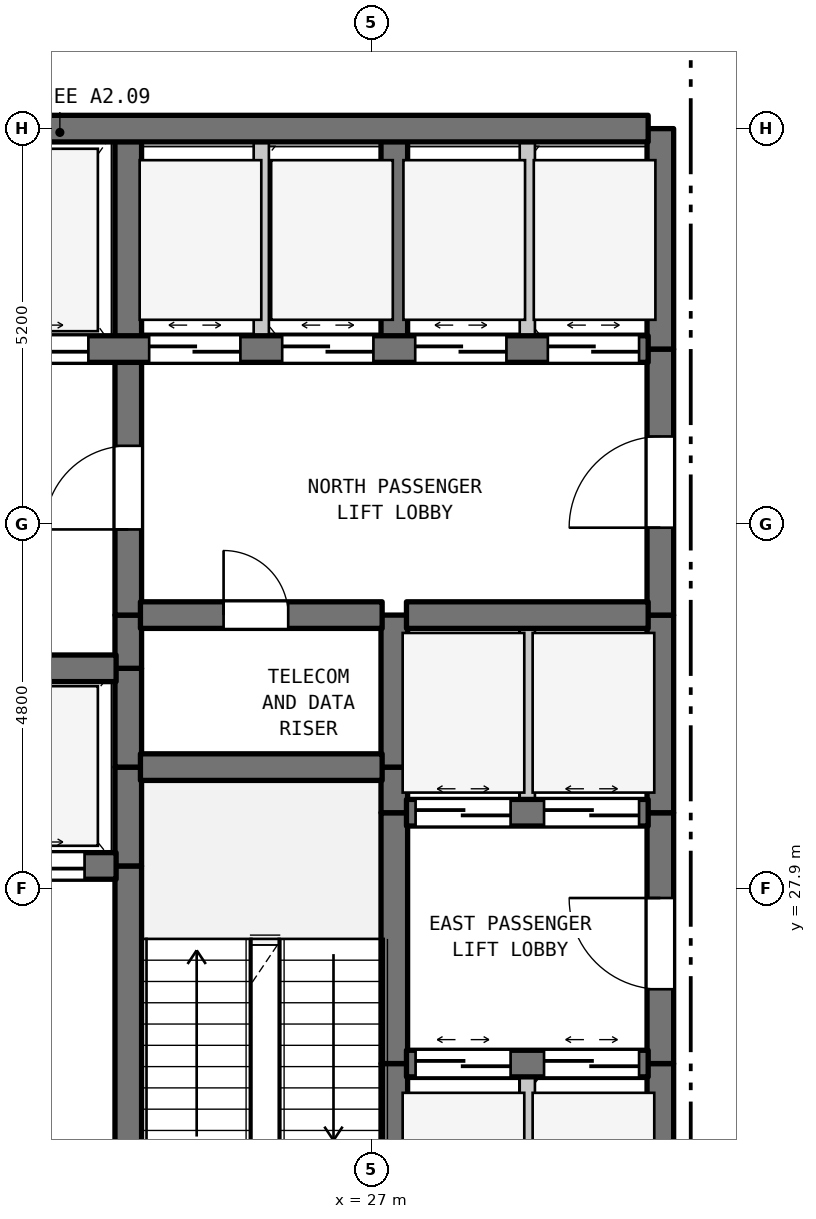
"""IFC4 building model, lengths in metres.
Left out: names, types, materials, properties, quantities, classifications, styles, units other than length and angle.
Written with IfcOpenShell. Run it as: python <this file> out.ifc"""

import sys

from ifc_helpers import new_model, si_unit, direction, frame, frame_2d, origin, place, context, subcontext, project, spatial, rectangle, extrude, element, fill, save


model = new_model("IFC4")
c1 = context("Model", 3, precision=1e-05, world=origin(), true_north=direction((0.0, 1.0)))
c2 = subcontext(c1, "Body", "Model", "MODEL_VIEW")
j1 = project(units=[si_unit("LENGTHUNIT", "METRE"), si_unit("PLANEANGLEUNIT", "RADIAN")], contexts=[c1])
p1 = place(None, origin())
s1 = spatial("IfcSite", under=j1, at=p1, CompositionType="ELEMENT")
p2 = place(p1, origin())
s2 = spatial("IfcBuilding", under=s1, at=p2, CompositionType="ELEMENT")
p3 = place(p2, frame((0.0, 0.0, 98.3)))
s3 = spatial("IfcBuildingStorey", under=s2, at=p3, CompositionType="ELEMENT", Elevation=98.3)
p4 = place(p3, frame((23.8, 22.7, 0.0), z_axis=(0.0, 0.0, 1.0), x_axis=(0.0, 1.0, 0.0)))
e1 = element("IfcWall", 1, at=p4, inside=s3, PredefinedType="SHEAR", context=c2, shape_type="SweptSolid", body=[
    extrude(rectangle(XDim=5.5, YDim=0.35, at=frame_2d((2.75, 0.0))), origin(), (0.0, 0.0, 1.0), 3.385),
])
p5 = place(p4, frame((0.235, 0.0, 0.0)))
e2 = element("IfcOpeningElement", 2, at=p5, cuts=e1, PredefinedType="OPENING", context=c2, shape_type="SweptSolid", body=[
    extrude(rectangle(XDim=1.1, YDim=2.15, at=frame_2d((0.55, 1.075))), frame((0.0, 0.185, 0.0), z_axis=(0.0, -1.0, 0.0), x_axis=(1.0, 0.0, 0.0)), (0.0, 0.0, 1.0), 0.37),
])
for number, where, z_axis, x_axis in (
    (3, (23.8, 28.2, 0.0), (0.0, 0.0, 1.0), (0.0, 1.0, 0.0)),
    (4, (23.8, 29.5, 0.0), (0.0, 0.0, 1.0), (0.0, 1.0, 0.0)),
):
    element("IfcWall", number, at=place(p3, frame(where, z_axis=z_axis, x_axis=x_axis)), inside=s3, PredefinedType="SHEAR", context=c2, shape_type="SweptSolid", body=[
        extrude(rectangle(XDim=1.3, YDim=0.35, at=frame_2d((0.65, 0.0))), origin(), (0.0, 0.0, 1.0), 3.385),
    ])
p6 = place(p3, frame((23.8, 30.8, 0.0), z_axis=(0.0, 0.0, 1.0), x_axis=(0.0, 1.0, 0.0)))
e5 = element("IfcWall", 5, at=p6, inside=s3, PredefinedType="SHEAR", context=c2, shape_type="SweptSolid", body=[
    extrude(rectangle(XDim=0.7, YDim=0.35, at=frame_2d((0.35, 0.0))), origin(), (0.0, 0.0, 1.0), 3.385),
])
p7 = place(p3, frame((23.8, 31.5, 0.0), z_axis=(0.0, 0.0, 1.0), x_axis=(0.0, 1.0, 0.0)))
e6 = element("IfcWall", 6, at=p7, inside=s3, PredefinedType="SHEAR", context=c2, shape_type="SweptSolid", body=[
    extrude(rectangle(XDim=3.5, YDim=0.35, at=frame_2d((1.75, 0.0))), origin(), (0.0, 0.0, 1.0), 3.385),
])
p8 = place(p7, frame((1.127, 0.0, 0.0)))
e7 = element("IfcOpeningElement", 7, at=p8, cuts=e6, PredefinedType="OPENING", context=c2, shape_type="SweptSolid", body=[
    extrude(rectangle(XDim=1.1, YDim=2.15, at=frame_2d((0.55, 1.075))), frame((0.0, 0.185, 0.0), z_axis=(0.0, -1.0, 0.0), x_axis=(1.0, 0.0, 0.0)), (0.0, 0.0, 1.0), 0.37),
])
p9 = place(p3, frame((23.8, 35.0, 0.0), z_axis=(0.0, 0.0, 1.0), x_axis=(0.0, 1.0, 0.0)))
e8 = element("IfcWall", 8, at=p9, inside=s3, PredefinedType="SHEAR", context=c2, shape_type="SweptSolid", body=[
    extrude(rectangle(XDim=2.9, YDim=0.35, at=frame_2d((1.45, 0.0))), origin(), (0.0, 0.0, 1.0), 3.385),
])
p10 = place(p3, frame((25.55, 35.0, 0.0), z_axis=(0.0, 0.0, 1.0), x_axis=(0.0, 1.0, 0.0)))
e9 = element("IfcWall", 9, at=p10, inside=s3, PredefinedType="STANDARD", context=c2, shape_type="SweptSolid", body=[
    extrude(rectangle(XDim=2.9, YDim=0.2, at=frame_2d((1.45, 0.0))), origin(), (0.0, 0.0, 1.0), 3.385),
])
p11 = place(p3, frame((27.3, 22.7, 0.0), z_axis=(0.0, 0.0, 1.0), x_axis=(0.0, 1.0, 0.0)))
e10 = element("IfcWall", 10, at=p11, inside=s3, PredefinedType="SHEAR", context=c2, shape_type="SweptSolid", body=[
    extrude(rectangle(XDim=2.9, YDim=0.35, at=frame_2d((1.45, 0.0))), origin(), (0.0, 0.0, 1.0), 3.385),
])
p12 = place(p3, frame((27.3, 25.6, 0.0), z_axis=(0.0, 0.0, 1.0), x_axis=(0.0, 1.0, 0.0)))
e11 = element("IfcWall", 11, at=p12, inside=s3, PredefinedType="SHEAR", context=c2, shape_type="SweptSolid", body=[
    extrude(rectangle(XDim=3.3, YDim=0.35, at=frame_2d((1.65, 0.0))), origin(), (0.0, 0.0, 1.0), 3.385),
])
p13 = place(p3, frame((27.3, 28.9, 0.0), z_axis=(0.0, 0.0, 1.0), x_axis=(0.0, 1.0, 0.0)))
e12 = element("IfcWall", 12, at=p13, inside=s3, PredefinedType="SHEAR", context=c2, shape_type="SweptSolid", body=[
    extrude(rectangle(XDim=0.6, YDim=0.35, at=frame_2d((0.3, 0.0))), origin(), (0.0, 0.0, 1.0), 3.385),
])
p14 = place(p3, frame((27.3, 29.5, 0.0), z_axis=(0.0, 0.0, 1.0), x_axis=(0.0, 1.0, 0.0)))
e13 = element("IfcWall", 13, at=p14, inside=s3, PredefinedType="SHEAR", context=c2, shape_type="SweptSolid", body=[
    extrude(rectangle(XDim=2.0, YDim=0.35, at=frame_2d((1.0, 0.0))), origin(), (0.0, 0.0, 1.0), 3.385),
])
p15 = place(p3, frame((27.3, 35.0, 0.0), z_axis=(0.0, 0.0, 1.0), x_axis=(0.0, 1.0, 0.0)))
e14 = element("IfcWall", 14, at=p15, inside=s3, PredefinedType="SHEAR", context=c2, shape_type="SweptSolid", body=[
    extrude(rectangle(XDim=2.9, YDim=0.35, at=frame_2d((1.45, 0.0))), origin(), (0.0, 0.0, 1.0), 3.385),
])
p16 = place(p3, frame((29.05, 22.7, 0.0), z_axis=(0.0, 0.0, 1.0), x_axis=(0.0, 1.0, 0.0)))
e15 = element("IfcWall", 15, at=p16, inside=s3, PredefinedType="STANDARD", context=c2, shape_type="SweptSolid", body=[
    extrude(rectangle(XDim=2.9, YDim=0.2, at=frame_2d((1.45, 0.0))), origin(), (0.0, 0.0, 1.0), 3.385),
])
p17 = place(p3, frame((29.05, 28.9, 0.0), z_axis=(0.0, 0.0, 1.0), x_axis=(0.0, 1.0, 0.0)))
e16 = element("IfcWall", 16, at=p17, inside=s3, PredefinedType="STANDARD", context=c2, shape_type="SweptSolid", body=[
    extrude(rectangle(XDim=2.6, YDim=0.2, at=frame_2d((1.3, 0.0))), origin(), (0.0, 0.0, 1.0), 3.385),
])
p18 = place(p3, frame((29.05, 35.0, 0.0), z_axis=(0.0, 0.0, 1.0), x_axis=(0.0, 1.0, 0.0)))
e17 = element("IfcWall", 17, at=p18, inside=s3, PredefinedType="STANDARD", context=c2, shape_type="SweptSolid", body=[
    extrude(rectangle(XDim=2.9, YDim=0.2, at=frame_2d((1.45, 0.0))), origin(), (0.0, 0.0, 1.0), 3.385),
])
p19 = place(p3, frame((30.8, 22.7, 0.0), z_axis=(0.0, 0.0, 1.0), x_axis=(0.0, 1.0, 0.0)))
e18 = element("IfcWall", 18, at=p19, inside=s3, PredefinedType="SHEAR", context=c2, shape_type="SweptSolid", body=[
    extrude(rectangle(XDim=2.9, YDim=0.35, at=frame_2d((1.45, 0.0))), origin(), (0.0, 0.0, 1.0), 3.385),
])
p20 = place(p3, frame((30.8, 25.6, 0.0), z_axis=(0.0, 0.0, 1.0), x_axis=(0.0, 1.0, 0.0)))
e19 = element("IfcWall", 19, at=p20, inside=s3, PredefinedType="SHEAR", context=c2, shape_type="SweptSolid", body=[
    extrude(rectangle(XDim=3.3, YDim=0.35, at=frame_2d((1.65, 0.0))), origin(), (0.0, 0.0, 1.0), 3.385),
])
p21 = place(p20, frame((0.978, 0.0, 0.0)))
e20 = element("IfcOpeningElement", 20, at=p21, cuts=e19, PredefinedType="OPENING", context=c2, shape_type="SweptSolid", body=[
    extrude(rectangle(XDim=1.2, YDim=2.2, at=frame_2d((0.6, 1.1))), frame((0.0, 0.185, 0.0), z_axis=(0.0, -1.0, 0.0), x_axis=(1.0, 0.0, 0.0)), (0.0, 0.0, 1.0), 0.37),
])
p22 = place(p3, frame((30.8, 28.9, 0.0), z_axis=(0.0, 0.0, 1.0), x_axis=(0.0, 1.0, 0.0)))
e21 = element("IfcWall", 21, at=p22, inside=s3, PredefinedType="SHEAR", context=c2, shape_type="SweptSolid", body=[
    extrude(rectangle(XDim=2.6, YDim=0.35, at=frame_2d((1.3, 0.0))), origin(), (0.0, 0.0, 1.0), 3.385),
])
p23 = place(p3, frame((30.8, 31.5, 0.0), z_axis=(0.0, 0.0, 1.0), x_axis=(0.0, 1.0, 0.0)))
e22 = element("IfcWall", 22, at=p23, inside=s3, PredefinedType="SHEAR", context=c2, shape_type="SweptSolid", body=[
    extrude(rectangle(XDim=3.5, YDim=0.35, at=frame_2d((1.75, 0.0))), origin(), (0.0, 0.0, 1.0), 3.385),
])
p24 = place(p23, frame((1.15, 0.0, 0.0)))
e23 = element("IfcOpeningElement", 23, at=p24, cuts=e22, PredefinedType="OPENING", context=c2, shape_type="SweptSolid", body=[
    extrude(rectangle(XDim=1.2, YDim=2.2, at=frame_2d((0.6, 1.1))), frame((0.0, 0.185, 0.0), z_axis=(0.0, -1.0, 0.0), x_axis=(1.0, 0.0, 0.0)), (0.0, 0.0, 1.0), 0.37),
])
p25 = place(p3, frame((30.8, 35.0, 0.0), z_axis=(0.0, 0.0, 1.0), x_axis=(0.0, 1.0, 0.0)))
e24 = element("IfcWall", 24, at=p25, inside=s3, PredefinedType="SHEAR", context=c2, shape_type="SweptSolid", body=[
    extrude(rectangle(XDim=2.9, YDim=0.35, at=frame_2d((1.45, 0.0))), origin(), (0.0, 0.0, 1.0), 3.385),
])
p26 = place(p3, frame((27.46, 25.6, 0.0), z_axis=(0.0, 0.0, 1.0), x_axis=(1.0, 0.0, 0.0)))
e25 = element("IfcWall", 25, at=p26, inside=s3, PredefinedType="SHEAR", context=c2, shape_type="SweptSolid", body=[
    extrude(rectangle(XDim=3.18, YDim=0.35, at=frame_2d((1.59, 0.0))), origin(), (0.0, 0.0, 1.0), 3.385),
])
p27 = place(p26, frame((0.12, 0.0, 0.0)))
e26 = element("IfcOpeningElement", 26, at=p27, cuts=e25, PredefinedType="OPENING", context=c2, shape_type="SweptSolid", body=[
    extrude(rectangle(XDim=1.25, YDim=2.2, at=frame_2d((0.625, 1.1))), frame((0.0, 0.185, 0.0), z_axis=(0.0, -1.0, 0.0), x_axis=(1.0, 0.0, 0.0)), (0.0, 0.0, 1.0), 0.37),
])
p28 = place(p26, frame((1.81, 0.0, 0.0)))
e27 = element("IfcOpeningElement", 27, at=p28, cuts=e25, PredefinedType="OPENING", context=c2, shape_type="SweptSolid", body=[
    extrude(rectangle(XDim=1.25, YDim=2.2, at=frame_2d((0.625, 1.1))), frame((0.0, 0.185, 0.0), z_axis=(0.0, -1.0, 0.0), x_axis=(1.0, 0.0, 0.0)), (0.0, 0.0, 1.0), 0.37),
])
p29 = place(p3, frame((19.16, 28.2, 0.0), z_axis=(0.0, 0.0, 1.0), x_axis=(1.0, 0.0, 0.0)))
e28 = element("IfcWall", 28, at=p29, inside=s3, PredefinedType="SHEAR", context=c2, shape_type="SweptSolid", body=[
    extrude(rectangle(XDim=4.48, YDim=0.35, at=frame_2d((2.24, 0.0))), origin(), (0.0, 0.0, 1.0), 3.385),
])
p30 = place(p29, frame((0.415, 0.0, 0.0)))
e29 = element("IfcOpeningElement", 29, at=p30, cuts=e28, PredefinedType="OPENING", context=c2, shape_type="SweptSolid", body=[
    extrude(rectangle(XDim=1.25, YDim=2.2, at=frame_2d((0.625, 1.1))), frame((0.0, 0.185, 0.0), z_axis=(0.0, -1.0, 0.0), x_axis=(1.0, 0.0, 0.0)), (0.0, 0.0, 1.0), 0.37),
])
p31 = place(p29, frame((2.815, 0.0, 0.0)))
e30 = element("IfcOpeningElement", 30, at=p31, cuts=e28, PredefinedType="OPENING", context=c2, shape_type="SweptSolid", body=[
    extrude(rectangle(XDim=1.25, YDim=2.2, at=frame_2d((0.625, 1.1))), frame((0.0, 0.185, 0.0), z_axis=(0.0, -1.0, 0.0), x_axis=(1.0, 0.0, 0.0)), (0.0, 0.0, 1.0), 0.37),
])
p32 = place(p3, frame((27.46, 28.9, 0.0), z_axis=(0.0, 0.0, 1.0), x_axis=(1.0, 0.0, 0.0)))
e31 = element("IfcWall", 31, at=p32, inside=s3, PredefinedType="SHEAR", context=c2, shape_type="SweptSolid", body=[
    extrude(rectangle(XDim=3.18, YDim=0.35, at=frame_2d((1.59, 0.0))), origin(), (0.0, 0.0, 1.0), 3.385),
])
p33 = place(p32, frame((0.12, 0.0, 0.0)))
e32 = element("IfcOpeningElement", 32, at=p33, cuts=e31, PredefinedType="OPENING", context=c2, shape_type="SweptSolid", body=[
    extrude(rectangle(XDim=1.25, YDim=2.2, at=frame_2d((0.625, 1.1))), frame((0.0, 0.185, 0.0), z_axis=(0.0, -1.0, 0.0), x_axis=(1.0, 0.0, 0.0)), (0.0, 0.0, 1.0), 0.37),
])
p34 = place(p32, frame((1.81, 0.0, 0.0)))
e33 = element("IfcOpeningElement", 33, at=p34, cuts=e31, PredefinedType="OPENING", context=c2, shape_type="SweptSolid", body=[
    extrude(rectangle(XDim=1.25, YDim=2.2, at=frame_2d((0.625, 1.1))), frame((0.0, 0.185, 0.0), z_axis=(0.0, -1.0, 0.0), x_axis=(1.0, 0.0, 0.0)), (0.0, 0.0, 1.0), 0.37),
])
p35 = place(p3, frame((23.96, 29.5, 0.0), z_axis=(0.0, 0.0, 1.0), x_axis=(1.0, 0.0, 0.0)))
e34 = element("IfcWall", 34, at=p35, inside=s3, PredefinedType="SHEAR", context=c2, shape_type="SweptSolid", body=[
    extrude(rectangle(XDim=3.18, YDim=0.35, at=frame_2d((1.59, 0.0))), origin(), (0.0, 0.0, 1.0), 3.385),
])
p36 = place(p3, frame((19.16, 30.8, 0.0), z_axis=(0.0, 0.0, 1.0), x_axis=(1.0, 0.0, 0.0)))
e35 = element("IfcWall", 35, at=p36, inside=s3, PredefinedType="SHEAR", context=c2, shape_type="SweptSolid", body=[
    extrude(rectangle(XDim=4.48, YDim=0.35, at=frame_2d((2.24, 0.0))), origin(), (0.0, 0.0, 1.0), 3.385),
])
p37 = place(p3, frame((23.96, 31.5, 0.0), z_axis=(0.0, 0.0, 1.0), x_axis=(1.0, 0.0, 0.0)))
e36 = element("IfcWall", 36, at=p37, inside=s3, PredefinedType="SHEAR", context=c2, shape_type="SweptSolid", body=[
    extrude(rectangle(XDim=3.18, YDim=0.35, at=frame_2d((1.59, 0.0))), origin(), (0.0, 0.0, 1.0), 3.385),
])
p38 = place(p37, frame((1.094, 0.0, 0.0)))
e37 = element("IfcOpeningElement", 37, at=p38, cuts=e36, PredefinedType="OPENING", context=c2, shape_type="SweptSolid", body=[
    extrude(rectangle(XDim=0.85, YDim=2.1, at=frame_2d((0.425, 1.05))), frame((0.0, 0.185, 0.0), z_axis=(0.0, -1.0, 0.0), x_axis=(1.0, 0.0, 0.0)), (0.0, 0.0, 1.0), 0.37),
])
p39 = place(p3, frame((27.46, 31.5, 0.0), z_axis=(0.0, 0.0, 1.0), x_axis=(1.0, 0.0, 0.0)))
e38 = element("IfcWall", 38, at=p39, inside=s3, PredefinedType="SHEAR", context=c2, shape_type="SweptSolid", body=[
    extrude(rectangle(XDim=3.18, YDim=0.35, at=frame_2d((1.59, 0.0))), origin(), (0.0, 0.0, 1.0), 3.385),
])
p40 = place(p3, frame((19.16, 35.0, 0.0), z_axis=(0.0, 0.0, 1.0), x_axis=(1.0, 0.0, 0.0)))
e39 = element("IfcWall", 39, at=p40, inside=s3, PredefinedType="SHEAR", context=c2, shape_type="SweptSolid", body=[
    extrude(rectangle(XDim=11.48, YDim=0.35, at=frame_2d((5.74, 0.0))), origin(), (0.0, 0.0, 1.0), 3.385),
])
p41 = place(p40, frame((0.365, 0.0, 0.0)))
e40 = element("IfcOpeningElement", 40, at=p41, cuts=e39, PredefinedType="OPENING", context=c2, shape_type="SweptSolid", body=[
    extrude(rectangle(XDim=1.35, YDim=2.2, at=frame_2d((0.675, 1.1))), frame((0.0, 0.185, 0.0), z_axis=(0.0, -1.0, 0.0), x_axis=(1.0, 0.0, 0.0)), (0.0, 0.0, 1.0), 0.37),
])
p42 = place(p40, frame((2.765, 0.0, 0.0)))
e41 = element("IfcOpeningElement", 41, at=p42, cuts=e39, PredefinedType="OPENING", context=c2, shape_type="SweptSolid", body=[
    extrude(rectangle(XDim=1.35, YDim=2.2, at=frame_2d((0.675, 1.1))), frame((0.0, 0.185, 0.0), z_axis=(0.0, -1.0, 0.0), x_axis=(1.0, 0.0, 0.0)), (0.0, 0.0, 1.0), 0.37),
])
p43 = place(p40, frame((4.915, 0.0, 0.0)))
e42 = element("IfcOpeningElement", 42, at=p43, cuts=e39, PredefinedType="OPENING", context=c2, shape_type="SweptSolid", body=[
    extrude(rectangle(XDim=1.2, YDim=2.2, at=frame_2d((0.6, 1.1))), frame((0.0, 0.185, 0.0), z_axis=(0.0, -1.0, 0.0), x_axis=(1.0, 0.0, 0.0)), (0.0, 0.0, 1.0), 0.37),
])
p44 = place(p40, frame((6.665, 0.0, 0.0)))
e43 = element("IfcOpeningElement", 43, at=p44, cuts=e39, PredefinedType="OPENING", context=c2, shape_type="SweptSolid", body=[
    extrude(rectangle(XDim=1.2, YDim=2.2, at=frame_2d((0.6, 1.1))), frame((0.0, 0.185, 0.0), z_axis=(0.0, -1.0, 0.0), x_axis=(1.0, 0.0, 0.0)), (0.0, 0.0, 1.0), 0.37),
])
p45 = place(p40, frame((8.415, 0.0, 0.0)))
e44 = element("IfcOpeningElement", 44, at=p45, cuts=e39, PredefinedType="OPENING", context=c2, shape_type="SweptSolid", body=[
    extrude(rectangle(XDim=1.2, YDim=2.2, at=frame_2d((0.6, 1.1))), frame((0.0, 0.185, 0.0), z_axis=(0.0, -1.0, 0.0), x_axis=(1.0, 0.0, 0.0)), (0.0, 0.0, 1.0), 0.37),
])
p46 = place(p40, frame((10.16, 0.0, 0.0)))
e45 = element("IfcOpeningElement", 45, at=p46, cuts=e39, PredefinedType="OPENING", context=c2, shape_type="SweptSolid", body=[
    extrude(rectangle(XDim=1.2, YDim=2.2, at=frame_2d((0.6, 1.1))), frame((0.0, 0.185, 0.0), z_axis=(0.0, -1.0, 0.0), x_axis=(1.0, 0.0, 0.0)), (0.0, 0.0, 1.0), 0.37),
])
p47 = place(p3, frame((19.16, 37.9, 0.0), z_axis=(0.0, 0.0, 1.0), x_axis=(1.0, 0.0, 0.0)))
e46 = element("IfcWall", 46, at=p47, inside=s3, PredefinedType="SHEAR", context=c2, shape_type="SweptSolid", body=[
    extrude(rectangle(XDim=11.48, YDim=0.35, at=frame_2d((5.74, 0.0))), origin(), (0.0, 0.0, 1.0), 3.385),
])
p48 = place(p8, origin())
e47 = element("IfcDoor", 47, at=p48, inside=s3, OperationType="SINGLE_SWING_LEFT", PredefinedType="DOOR", context=c2, shape_type="SweptSolid", body=[
    extrude(rectangle(XDim=1.1, YDim=2.15, at=frame_2d((0.55, 1.075))), frame((0.0, 0.025, 0.0), z_axis=(0.0, -1.0, 0.0), x_axis=(1.0, 0.0, 0.0)), (0.0, 0.0, 1.0), 0.05),
])
fill(e7, e47)
p49 = place(p21, origin())
e48 = element("IfcDoor", 48, at=p49, inside=s3, OperationType="SINGLE_SWING_RIGHT", PredefinedType="DOOR", context=c2, shape_type="SweptSolid", body=[
    extrude(rectangle(XDim=1.2, YDim=2.2, at=frame_2d((0.6, 1.1))), frame((0.0, 0.025, 0.0), z_axis=(0.0, -1.0, 0.0), x_axis=(1.0, 0.0, 0.0)), (0.0, 0.0, 1.0), 0.05),
])
fill(e20, e48)
p50 = place(p24, origin())
e49 = element("IfcDoor", 49, at=p50, inside=s3, OperationType="SINGLE_SWING_LEFT", PredefinedType="DOOR", context=c2, shape_type="SweptSolid", body=[
    extrude(rectangle(XDim=1.2, YDim=2.2, at=frame_2d((0.6, 1.1))), frame((0.0, 0.025, 0.0), z_axis=(0.0, -1.0, 0.0), x_axis=(1.0, 0.0, 0.0)), (0.0, 0.0, 1.0), 0.05),
])
fill(e23, e49)
p51 = place(p27, origin())
e50 = element("IfcDoor", 50, at=p51, inside=s3, OperationType="DOUBLE_DOOR_SLIDING", PredefinedType="DOOR", context=c2, shape_type="SweptSolid", body=[
    extrude(rectangle(XDim=1.25, YDim=2.2, at=frame_2d((0.625, 1.1))), frame((0.0, 0.025, 0.0), z_axis=(0.0, -1.0, 0.0), x_axis=(1.0, 0.0, 0.0)), (0.0, 0.0, 1.0), 0.05),
])
fill(e26, e50)
p52 = place(p28, origin())
e51 = element("IfcDoor", 51, at=p52, inside=s3, OperationType="DOUBLE_DOOR_SLIDING", PredefinedType="DOOR", context=c2, shape_type="SweptSolid", body=[
    extrude(rectangle(XDim=1.25, YDim=2.2, at=frame_2d((0.625, 1.1))), frame((0.0, 0.025, 0.0), z_axis=(0.0, -1.0, 0.0), x_axis=(1.0, 0.0, 0.0)), (0.0, 0.0, 1.0), 0.05),
])
fill(e27, e51)
p53 = place(p31, origin())
e52 = element("IfcDoor", 52, at=p53, inside=s3, OperationType="DOUBLE_DOOR_SLIDING", PredefinedType="DOOR", context=c2, shape_type="SweptSolid", body=[
    extrude(rectangle(XDim=1.25, YDim=2.2, at=frame_2d((0.625, 1.1))), frame((0.0, 0.025, 0.0), z_axis=(0.0, -1.0, 0.0), x_axis=(1.0, 0.0, 0.0)), (0.0, 0.0, 1.0), 0.05),
])
fill(e30, e52)
p54 = place(p33, origin())
e53 = element("IfcDoor", 53, at=p54, inside=s3, OperationType="DOUBLE_DOOR_SLIDING", PredefinedType="DOOR", context=c2, shape_type="SweptSolid", body=[
    extrude(rectangle(XDim=1.25, YDim=2.2, at=frame_2d((0.625, 1.1))), frame((0.0, 0.025, 0.0), z_axis=(0.0, -1.0, 0.0), x_axis=(1.0, 0.0, 0.0)), (0.0, 0.0, 1.0), 0.05),
])
fill(e32, e53)
p55 = place(p34, origin())
e54 = element("IfcDoor", 54, at=p55, inside=s3, OperationType="DOUBLE_DOOR_SLIDING", PredefinedType="DOOR", context=c2, shape_type="SweptSolid", body=[
    extrude(rectangle(XDim=1.25, YDim=2.2, at=frame_2d((0.625, 1.1))), frame((0.0, 0.025, 0.0), z_axis=(0.0, -1.0, 0.0), x_axis=(1.0, 0.0, 0.0)), (0.0, 0.0, 1.0), 0.05),
])
fill(e33, e54)
p56 = place(p38, origin())
e55 = element("IfcDoor", 55, at=p56, inside=s3, OperationType="SINGLE_SWING_LEFT", PredefinedType="DOOR", context=c2, shape_type="SweptSolid", body=[
    extrude(rectangle(XDim=0.85, YDim=2.1, at=frame_2d((0.425, 1.05))), frame((0.0, 0.025, 0.0), z_axis=(0.0, -1.0, 0.0), x_axis=(1.0, 0.0, 0.0)), (0.0, 0.0, 1.0), 0.05),
])
fill(e37, e55)
p57 = place(p42, origin())
e56 = element("IfcDoor", 56, at=p57, inside=s3, OperationType="DOUBLE_DOOR_SLIDING", PredefinedType="DOOR", context=c2, shape_type="SweptSolid", body=[
    extrude(rectangle(XDim=1.35, YDim=2.2, at=frame_2d((0.675, 1.1))), frame((0.0, 0.025, 0.0), z_axis=(0.0, -1.0, 0.0), x_axis=(1.0, 0.0, 0.0)), (0.0, 0.0, 1.0), 0.05),
])
fill(e41, e56)
p58 = place(p43, origin())
e57 = element("IfcDoor", 57, at=p58, inside=s3, OperationType="DOUBLE_DOOR_SLIDING", PredefinedType="DOOR", context=c2, shape_type="SweptSolid", body=[
    extrude(rectangle(XDim=1.2, YDim=2.2, at=frame_2d((0.6, 1.1))), frame((0.0, 0.025, 0.0), z_axis=(0.0, -1.0, 0.0), x_axis=(1.0, 0.0, 0.0)), (0.0, 0.0, 1.0), 0.05),
])
fill(e42, e57)
p59 = place(p44, origin())
e58 = element("IfcDoor", 58, at=p59, inside=s3, OperationType="DOUBLE_DOOR_SLIDING", PredefinedType="DOOR", context=c2, shape_type="SweptSolid", body=[
    extrude(rectangle(XDim=1.2, YDim=2.2, at=frame_2d((0.6, 1.1))), frame((0.0, 0.025, 0.0), z_axis=(0.0, -1.0, 0.0), x_axis=(1.0, 0.0, 0.0)), (0.0, 0.0, 1.0), 0.05),
])
fill(e43, e58)
p60 = place(p45, origin())
e59 = element("IfcDoor", 59, at=p60, inside=s3, OperationType="DOUBLE_DOOR_SLIDING", PredefinedType="DOOR", context=c2, shape_type="SweptSolid", body=[
    extrude(rectangle(XDim=1.2, YDim=2.2, at=frame_2d((0.6, 1.1))), frame((0.0, 0.025, 0.0), z_axis=(0.0, -1.0, 0.0), x_axis=(1.0, 0.0, 0.0)), (0.0, 0.0, 1.0), 0.05),
])
fill(e44, e59)
p61 = place(p46, origin())
e60 = element("IfcDoor", 60, at=p61, inside=s3, OperationType="DOUBLE_DOOR_SLIDING", PredefinedType="DOOR", context=c2, shape_type="SweptSolid", body=[
    extrude(rectangle(XDim=1.2, YDim=2.2, at=frame_2d((0.6, 1.1))), frame((0.0, 0.025, 0.0), z_axis=(0.0, -1.0, 0.0), x_axis=(1.0, 0.0, 0.0)), (0.0, 0.0, 1.0), 0.05),
])
fill(e45, e60)
save(model, sys.argv[1])
